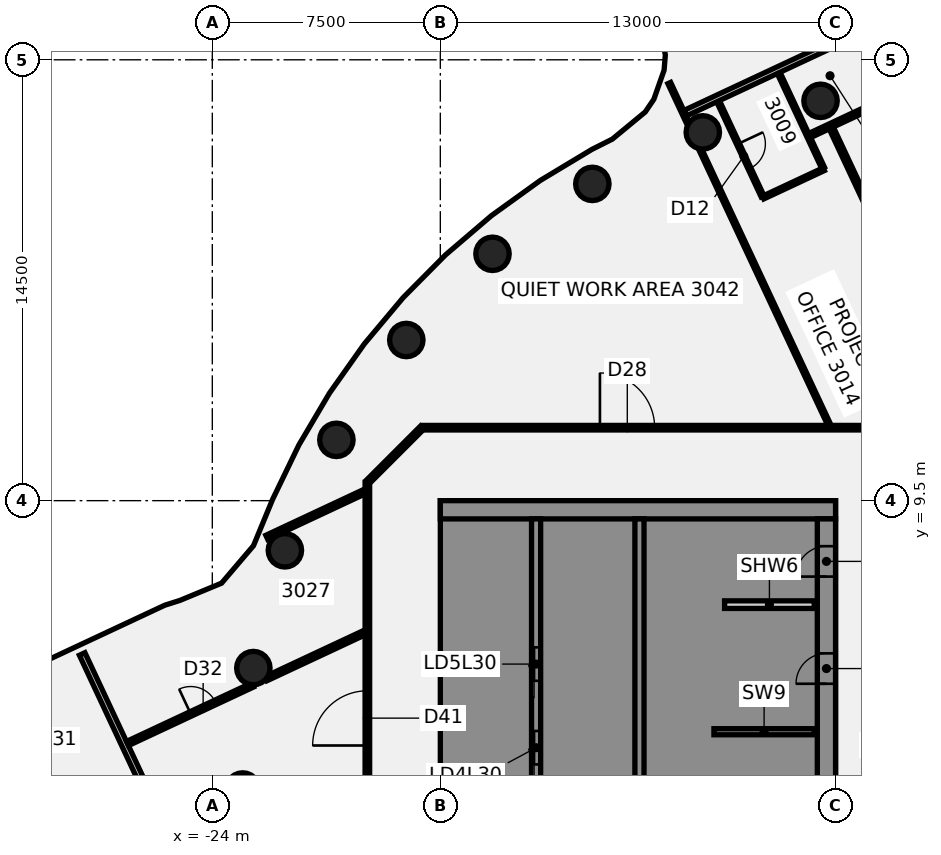
"""IFC4 building model, lengths in metres.
Left out: names, types, materials, properties, quantities, classifications, styles, units other than length and angle.
Written with IfcOpenShell. Run it as: python <this file> out.ifc"""

import sys

from ifc_helpers import new_model, si_unit, direction, frame, frame_2d, origin, origin_2d, place, context, subcontext, project, spatial, polyline, rectangle, circle, outline, extrude, element, fill, save


model = new_model("IFC4")
c1 = context("Model", 3, precision=1e-05, world=origin(), true_north=direction((0.0, 1.0)))
c2 = subcontext(c1, "Body", "Model", "MODEL_VIEW")
j1 = project(units=[si_unit("LENGTHUNIT", "METRE"), si_unit("PLANEANGLEUNIT", "RADIAN")], contexts=[c1])
p1 = place(None, origin())
s1 = spatial("IfcSite", under=j1, at=p1, CompositionType="ELEMENT")
p2 = place(p1, origin())
s2 = spatial("IfcBuilding", under=s1, at=p2, CompositionType="ELEMENT")
p3 = place(p2, frame((0.0, 0.0, 124.75)))
s3 = spatial("IfcBuildingStorey", under=s2, at=p3, CompositionType="ELEMENT", Elevation=124.75)
for number, where, z_axis, x_axis in (
    (1, (-3.994, 22.651, -0.14), (0.0, 0.0, 1.0), (1.0, 0.0, 0.0)),
    (2, (-7.866, 21.613, -0.14), (0.0, 0.0, 1.0), (1.0, 0.0, 0.0)),
    (3, (-11.5, 19.919, -0.14), (0.0, 0.0, 1.0), (1.0, 0.0, 0.0)),
    (4, (-14.784, 17.619, -0.14), (0.0, 0.0, 1.0), (1.0, 0.0, 0.0)),
    (5, (-17.619, 14.784, -0.14), (0.0, 0.0, 1.0), (1.0, 0.0, 0.0)),
    (6, (-19.919, 11.5, -0.14), (0.0, 0.0, 1.0), (1.0, 0.0, 0.0)),
    (7, (-21.613, 7.866, -0.14), (0.0, 0.0, 1.0), (1.0, 0.0, 0.0)),
    (8, (-22.651, 3.994, -0.14), (0.0, 0.0, 1.0), (1.0, 0.0, 0.0)),
    (9, (-23.0, 0.0, -0.14), (0.0, 0.0, 1.0), (1.0, 0.0, 0.0)),
):
    element("IfcColumn", number, at=place(p3, frame(where, z_axis=z_axis, x_axis=x_axis)), inside=s3, PredefinedType="COLUMN", context=c2, shape_type="SweptSolid", body=[
        extrude(circle(Radius=0.55, at=origin_2d()), origin(), (0.0, 0.0, 1.0), 3.71),
    ])
p4 = place(p3, frame((-28.281, 4.457, 0.0), z_axis=(0.0, 0.0, 1.0), x_axis=(0.423799855828, -0.90575586236, 0.0)))
e10 = element("IfcWall", 10, at=p4, inside=s3, PredefinedType="PARTITIONING", context=c2, shape_type="SweptSolid", body=[
    extrude(rectangle(XDim=14.219, YDim=0.2, at=frame_2d((7.109, 0.0))), origin(), (0.0, 0.0, 1.0), 2.87),
])
p5 = place(p4, frame((5.8, 0.0, 0.0)))
e11 = element("IfcOpeningElement", 11, at=p5, cuts=e10, PredefinedType="OPENING", context=c2, shape_type="SweptSolid", body=[
    extrude(rectangle(XDim=1.4, YDim=2.1, at=frame_2d((0.7, 1.05))), frame((0.0, 0.11, 0.0), z_axis=(0.0, -1.0, 0.0), x_axis=(1.0, 0.0, 0.0)), (0.0, 0.0, 1.0), 0.22),
])
p6 = place(p3, frame((-10.294, 41.169, 0.0), z_axis=(0.0, 0.0, 1.0), x_axis=(0.423769207005, -0.905770202201, 0.0)))
e12 = element("IfcWall", 12, at=p6, inside=s3, PredefinedType="PARTITIONING", context=c2, shape_type="SweptSolid", body=[
    extrude(rectangle(XDim=20.246, YDim=0.15, at=frame_2d((10.123, 0.0))), origin(), (0.0, 0.0, 1.0), 2.87),
])
p7 = place(p6, frame((18.375, 0.0, 0.0)))
e13 = element("IfcOpeningElement", 13, at=p7, cuts=e12, PredefinedType="OPENING", context=c2, shape_type="SweptSolid", body=[
    extrude(rectangle(XDim=1.0, YDim=2.1, at=frame_2d((0.5, 1.05))), frame((0.0, 0.085, 0.0), z_axis=(0.0, -1.0, 0.0), x_axis=(1.0, 0.0, 0.0)), (0.0, 0.0, 1.0), 0.17),
])
p8 = place(p6, frame((15.825, 0.0, 0.0)))
e14 = element("IfcOpeningElement", 14, at=p8, cuts=e12, PredefinedType="OPENING", context=c2, shape_type="SweptSolid", body=[
    extrude(rectangle(XDim=0.9, YDim=2.1, at=frame_2d((0.45, 1.05))), frame((0.0, 0.085, 0.0), z_axis=(0.0, -1.0, 0.0), x_axis=(1.0, 0.0, 0.0)), (0.0, 0.0, 1.0), 0.17),
])
p9 = place(p6, frame((10.125, 0.0, 0.0)))
e15 = element("IfcOpeningElement", 15, at=p9, cuts=e12, PredefinedType="OPENING", context=c2, shape_type="SweptSolid", body=[
    extrude(rectangle(XDim=0.9, YDim=2.1, at=frame_2d((0.45, 1.05))), frame((0.0, 0.085, 0.0), z_axis=(0.0, -1.0, 0.0), x_axis=(1.0, 0.0, 0.0)), (0.0, 0.0, 1.0), 0.17),
])
p10 = place(p6, frame((6.825, 0.0, 0.0)))
e16 = element("IfcOpeningElement", 16, at=p10, cuts=e12, PredefinedType="OPENING", context=c2, shape_type="SweptSolid", body=[
    extrude(rectangle(XDim=0.9, YDim=2.1, at=frame_2d((0.45, 1.05))), frame((0.0, 0.085, 0.0), z_axis=(0.0, -1.0, 0.0), x_axis=(1.0, 0.0, 0.0)), (0.0, 0.0, 1.0), 0.17),
])
p11 = place(p6, frame((2.325, 0.0, 0.0)))
e17 = element("IfcOpeningElement", 17, at=p11, cuts=e12, PredefinedType="OPENING", context=c2, shape_type="SweptSolid", body=[
    extrude(rectangle(XDim=0.9, YDim=2.1, at=frame_2d((0.45, 1.05))), frame((0.0, 0.085, 0.0), z_axis=(0.0, -1.0, 0.0), x_axis=(1.0, 0.0, 0.0)), (0.0, 0.0, 1.0), 0.17),
])
p12 = place(p3, frame((-8.969, 23.236, 0.0), z_axis=(0.0, 0.0, 1.0), x_axis=(0.423755205879, -0.905776752567, 0.0)))
e18 = element("IfcWall", 18, at=p12, inside=s3, PredefinedType="PARTITIONING", context=c2, shape_type="SweptSolid", body=[
    extrude(rectangle(XDim=1.475, YDim=0.1, at=frame_2d((0.737, 0.0))), origin(), (0.0, 0.0, 1.0), 2.97),
])
p13 = place(p3, frame((-7.96, 21.078, 0.0), z_axis=(0.0, 0.0, 1.0), x_axis=(0.423844267344, -0.905735081047, 0.0)))
e19 = element("IfcWall", 19, at=p13, inside=s3, PredefinedType="PARTITIONING", context=c2, shape_type="SweptSolid", body=[
    extrude(rectangle(XDim=10.048, YDim=0.1, at=frame_2d((5.024, 0.0))), origin(), (0.0, 0.0, 1.0), 2.97),
])
p14 = place(p3, frame((-7.365, 22.638, 0.0), z_axis=(0.0, 0.0, 1.0), x_axis=(0.423671993632, -0.905815677614, 0.0)))
e20 = element("IfcWall", 20, at=p14, inside=s3, PredefinedType="PARTITIONING", context=c2, shape_type="SweptSolid", body=[
    extrude(rectangle(XDim=3.449, YDim=0.1, at=frame_2d((1.724, 0.0))), origin(), (0.0, 0.0, 1.0), 2.87),
])
p15 = place(p14, frame((1.55, 0.0, 0.0)))
e21 = element("IfcOpeningElement", 21, at=p15, cuts=e20, PredefinedType="OPENING", context=c2, shape_type="SweptSolid", body=[
    extrude(rectangle(XDim=0.9, YDim=2.1, at=frame_2d((0.45, 1.05))), frame((0.0, 0.06, 0.0), z_axis=(0.0, -1.0, 0.0), x_axis=(1.0, 0.0, 0.0)), (0.0, 0.0, 1.0), 0.12),
])
p16 = place(p3, frame((-5.371, 23.567, 0.0), z_axis=(0.0, 0.0, 1.0), x_axis=(0.423878271215, -0.90571916795, 0.0)))
e22 = element("IfcWall", 22, at=p16, inside=s3, PredefinedType="PARTITIONING", context=c2, shape_type="SweptSolid", body=[
    extrude(rectangle(XDim=3.446, YDim=0.1, at=frame_2d((1.723, 0.0))), origin(), (0.0, 0.0, 1.0), 2.87),
])
p17 = place(p3, frame((-3.641, 21.759, 0.0), z_axis=(0.0, 0.0, 1.0), x_axis=(0.423809726716, -0.905751243743, 0.0)))
e23 = element("IfcWall", 23, at=p17, inside=s3, PredefinedType="PARTITIONING", context=c2, shape_type="SweptSolid", body=[
    extrude(rectangle(XDim=10.785, YDim=0.15, at=frame_2d((5.393, 0.0))), origin(), (0.0, 0.0, 1.0), 2.97),
])
p18 = place(p17, frame((3.525, 0.0, 0.0)))
e24 = element("IfcOpeningElement", 24, at=p18, cuts=e23, PredefinedType="OPENING", context=c2, shape_type="SweptSolid", body=[
    extrude(rectangle(XDim=0.9, YDim=2.1, at=frame_2d((0.45, 1.05))), frame((0.0, 0.085, 0.0), z_axis=(0.0, -1.0, 0.0), x_axis=(1.0, 0.0, 0.0)), (0.0, 0.0, 1.0), 0.17),
])
p19 = place(p3, frame((-17.065, 11.9, 0.0), z_axis=(0.0, 0.0, 1.0), x_axis=(1.0, 0.0, 0.0)))
e25 = element("IfcWall", 25, at=p19, inside=s3, PredefinedType="PARTITIONING", context=c2, shape_type="SweptSolid", body=[
    extrude(rectangle(XDim=34.165, YDim=0.15, at=frame_2d((17.083, 0.0))), origin(), (0.0, 0.0, 1.0), 2.97),
])
p20 = place(p19, frame((20.887, 0.0, 0.0)))
e26 = element("IfcOpeningElement", 26, at=p20, cuts=e25, PredefinedType="OPENING", context=c2, shape_type="SweptSolid", body=[
    extrude(rectangle(XDim=1.8, YDim=2.1, at=frame_2d((0.9, 1.05))), frame((0.0, 0.085, 0.0), z_axis=(0.0, -1.0, 0.0), x_axis=(1.0, 0.0, 0.0)), (0.0, 0.0, 1.0), 0.17),
])
p21 = place(p19, frame((30.913, 0.0, 0.0)))
e27 = element("IfcOpeningElement", 27, at=p21, cuts=e25, PredefinedType="OPENING", context=c2, shape_type="SweptSolid", body=[
    extrude(rectangle(XDim=1.8, YDim=2.1, at=frame_2d((0.9, 1.05))), frame((0.0, 0.085, 0.0), z_axis=(0.0, -1.0, 0.0), x_axis=(1.0, 0.0, 0.0)), (0.0, 0.0, 1.0), 0.17),
])
p22 = place(p19, frame((5.815, 0.0, 0.0)))
e28 = element("IfcOpeningElement", 28, at=p22, cuts=e25, PredefinedType="OPENING", context=c2, shape_type="SweptSolid", body=[
    extrude(rectangle(XDim=1.8, YDim=2.1, at=frame_2d((0.9, 1.05))), frame((0.0, 0.085, 0.0), z_axis=(0.0, -1.0, 0.0), x_axis=(1.0, 0.0, 0.0)), (0.0, 0.0, 1.0), 0.17),
])
p23 = place(p3, frame((-26.788, 1.513, 0.0), z_axis=(0.0, 0.0, 1.0), x_axis=(0.905759991445, 0.42379103093, 0.0)))
e29 = element("IfcWall", 29, at=p23, inside=s3, PredefinedType="PARTITIONING", context=c2, shape_type="SweptSolid", body=[
    extrude(rectangle(XDim=4.545, YDim=0.15, at=frame_2d((2.272, 0.0))), origin(), (0.0, 0.0, 1.0), 2.97),
])
p24 = place(p23, frame((2.295, 0.0, 0.0)))
e30 = element("IfcOpeningElement", 30, at=p24, cuts=e29, PredefinedType="OPENING", context=c2, shape_type="SweptSolid", body=[
    extrude(rectangle(XDim=0.9, YDim=2.1, at=frame_2d((0.45, 1.05))), frame((0.0, 0.085, 0.0), z_axis=(0.0, -1.0, 0.0), x_axis=(1.0, 0.0, 0.0)), (0.0, 0.0, 1.0), 0.17),
])
p25 = place(p3, frame((-22.237, 3.643, 0.0), z_axis=(0.0, 0.0, 1.0), x_axis=(0.905759778977, 0.423791485034, 0.0)))
e31 = element("IfcWall", 31, at=p25, inside=s3, PredefinedType="PARTITIONING", context=c2, shape_type="SweptSolid", body=[
    extrude(rectangle(XDim=3.584, YDim=0.15, at=frame_2d((1.792, 0.0))), origin(), (0.0, 0.0, 1.0), 2.97),
])
p26 = place(p3, frame((-22.208, 8.293, 0.0), z_axis=(0.0, 0.0, 1.0), x_axis=(0.905741880745, 0.42382973641, 0.0)))
e32 = element("IfcWall", 32, at=p26, inside=s3, PredefinedType="PARTITIONING", context=c2, shape_type="SweptSolid", body=[
    extrude(rectangle(XDim=3.552, YDim=0.15, at=frame_2d((1.776, 0.0))), origin(), (0.0, 0.0, 1.0), 2.97),
])
p27 = place(p3, frame((-8.44, 22.246, 0.0), z_axis=(0.0, 0.0, 1.0), x_axis=(0.905948211467, 0.423388519139, 0.0)))
e33 = element("IfcWall", 33, at=p27, inside=s3, PredefinedType="PARTITIONING", context=c2, shape_type="SweptSolid", body=[
    extrude(rectangle(XDim=14.239, YDim=0.2, at=frame_2d((7.119, 0.0))), origin(), (0.0, 0.0, 1.0), 2.87),
])
p28 = place(p27, frame((6.64, 0.0, 0.0)))
e34 = element("IfcOpeningElement", 34, at=p28, cuts=e33, PredefinedType="OPENING", context=c2, shape_type="SweptSolid", body=[
    extrude(rectangle(XDim=1.4, YDim=2.1, at=frame_2d((0.7, 1.05))), frame((0.0, 0.11, 0.0), z_axis=(0.0, -1.0, 0.0), x_axis=(1.0, 0.0, 0.0)), (0.0, 0.0, 1.0), 0.22),
])
p29 = place(p3, frame((-5.882, 19.469, 0.0), z_axis=(0.0, 0.0, 1.0), x_axis=(0.905879588514, 0.423535324517, 0.0)))
e35 = element("IfcWall", 35, at=p29, inside=s3, PredefinedType="PARTITIONING", context=c2, shape_type="SweptSolid", body=[
    extrude(rectangle(XDim=2.2, YDim=0.1, at=frame_2d((1.1, 0.0))), origin(), (0.0, 0.0, 1.0), 2.97),
])
p30 = place(p3, frame((-4.352, 21.509, 0.0), z_axis=(0.0, 0.0, 1.0), x_axis=(0.905651681577, 0.424022442398, 0.0)))
e36 = element("IfcWall", 36, at=p30, inside=s3, PredefinedType="PARTITIONING", context=c2, shape_type="SweptSolid", body=[
    extrude(rectangle(XDim=2.95, YDim=0.15, at=frame_2d((1.475, 0.0))), origin(), (0.0, 0.0, 1.0), 2.87),
])
p31 = place(p3, frame((-18.872, 10.128, 0.0), z_axis=(0.0, 0.0, 1.0), x_axis=(0.707106781187, 0.707106781187, 0.0)))
e37 = element("IfcWall", 37, at=p31, inside=s3, PredefinedType="PARTITIONING", context=c2, shape_type="SweptSolid", body=[
    extrude(rectangle(XDim=2.505, YDim=0.15, at=frame_2d((1.253, 0.0))), origin(), (0.0, 0.0, 1.0), 2.97),
])
p32 = place(p3, frame((-18.9, -10.1, 0.0), z_axis=(0.0, 0.0, 1.0), x_axis=(0.0, 1.0, 0.0)))
e38 = element("IfcWall", 38, at=p32, inside=s3, PredefinedType="PARTITIONING", context=c2, shape_type="SweptSolid", body=[
    extrude(rectangle(XDim=20.2, YDim=0.15, at=frame_2d((10.1, 0.0))), origin(), (0.0, 0.0, 1.0), 2.97),
])
p33 = place(p32, frame((11.547, 0.0, 0.0)))
e39 = element("IfcOpeningElement", 39, at=p33, cuts=e38, PredefinedType="OPENING", context=c2, shape_type="SweptSolid", body=[
    extrude(rectangle(XDim=1.8, YDim=2.1, at=frame_2d((0.9, 1.05))), frame((0.0, 0.085, 0.0), z_axis=(0.0, -1.0, 0.0), x_axis=(1.0, 0.0, 0.0)), (0.0, 0.0, 1.0), 0.17),
])
p34 = place(p32, frame((4.51, 0.0, 0.0)))
e40 = element("IfcOpeningElement", 40, at=p34, cuts=e38, PredefinedType="OPENING", context=c2, shape_type="SweptSolid", body=[
    extrude(rectangle(XDim=0.9, YDim=2.1, at=frame_2d((0.45, 1.05))), frame((0.0, 0.085, 0.0), z_axis=(0.0, -1.0, 0.0), x_axis=(1.0, 0.0, 0.0)), (0.0, 0.0, 1.0), 0.17),
])
p35 = place(p3, origin())
e41 = element("IfcWall", 41, at=p35, inside=s3, PredefinedType="SHEAR", context=c2, shape_type="SweptSolid", body=[
    extrude(outline(polyline([(-13.5, -8.9), (-13.5, -8.125), (-15.9, -8.125), (-15.9, -5.625), (-13.5, -5.625), (-13.5, -5.375), (-15.9, -5.375), (-15.9, -2.875), (-13.5, -2.875), (-13.5, -2.625), (-15.9, -2.625), (-15.9, -0.125), (-13.5, -0.125), (-13.5, 0.125), (-15.9, 0.125), (-15.9, 2.625), (-13.5, 2.625), (-13.5, 2.875), (-15.9, 2.875), (-15.9, 5.375), (-13.5, 5.375), (-13.5, 5.625), (-15.9, 5.625), (-15.9, 8.125), (-13.5, 8.125), (-13.5, 8.9), (-15.9, 8.9), (-16.5, 8.9), (-16.5, -8.9), (-15.9, -8.9), (-13.5, -8.9)])), origin(), (0.0, 0.0, 1.0), 3.57),
])
p36 = place(p3, frame((-16.5, 9.2, 0.0), z_axis=(0.0, 0.0, 1.0), x_axis=(1.0, 0.0, 0.0)))
e42 = element("IfcWall", 42, at=p36, inside=s3, PredefinedType="SHEAR", context=c2, shape_type="SweptSolid", body=[
    extrude(rectangle(XDim=13.0, YDim=0.6, at=frame_2d((6.5, 0.0))), origin(), (0.0, 0.0, 1.0), 3.57),
])
p37 = place(p3, origin())
e43 = element("IfcWall", 43, at=p37, inside=s3, PredefinedType="SHEAR", context=c2, shape_type="SweptSolid", body=[
    extrude(outline(polyline([(-9.8, -5.375), (-9.8, -5.625), (-7.5, -5.625), (-7.2, -5.625), (-7.2, 8.9), (-7.5, 8.9), (-9.8, 8.9), (-9.8, 8.125), (-7.5, 8.125), (-7.5, 5.625), (-9.8, 5.625), (-9.8, 5.375), (-7.5, 5.375), (-7.5, 2.875), (-9.8, 2.875), (-9.8, 2.625), (-7.5, 2.625), (-7.5, 0.125), (-9.8, 0.125), (-9.8, -0.125), (-7.5, -0.125), (-7.5, -2.625), (-9.8, -2.625), (-9.8, -2.875), (-7.5, -2.875), (-7.5, -5.375), (-9.8, -5.375)])), origin(), (0.0, 0.0, 1.0), 3.57),
])
p38 = place(p3, frame((-7.5, 1.9, 0.0), z_axis=(0.0, 0.0, 1.0), x_axis=(1.0, 0.0, 0.0)))
e44 = element("IfcWall", 44, at=p38, inside=s3, PredefinedType="SHEAR", context=c2, shape_type="SweptSolid", body=[
    extrude(rectangle(XDim=3.3, YDim=0.2, at=frame_2d((1.65, 0.0))), origin(), (0.0, 0.0, 1.0), 3.57),
])
p39 = place(p3, frame((-13.35, -8.9, 0.0), z_axis=(0.0, 0.0, 1.0), x_axis=(0.0, 1.0, 0.0)))
e45 = element("IfcWall", 45, at=p39, inside=s3, PredefinedType="SHEAR", context=c2, shape_type="SweptSolid", body=[
    extrude(rectangle(XDim=17.8, YDim=0.3, at=frame_2d((8.9, 0.0))), origin(), (0.0, 0.0, 1.0), 3.57),
])
p40 = place(p39, frame((1.325, 0.0, 0.0)))
e46 = element("IfcOpeningElement", 46, at=p40, cuts=e45, PredefinedType="OPENING", context=c2, shape_type="SweptSolid", body=[
    extrude(rectangle(XDim=1.4, YDim=2.1, at=frame_2d((0.7, 1.05))), frame((0.0, 0.16, 0.0), z_axis=(0.0, -1.0, 0.0), x_axis=(1.0, 0.0, 0.0)), (0.0, 0.0, 1.0), 0.32),
])
p41 = place(p39, frame((4.225, 0.0, 0.0)))
e47 = element("IfcOpeningElement", 47, at=p41, cuts=e45, PredefinedType="OPENING", context=c2, shape_type="SweptSolid", body=[
    extrude(rectangle(XDim=1.1, YDim=2.1, at=frame_2d((0.55, 1.05))), frame((0.0, 0.16, 0.0), z_axis=(0.0, -1.0, 0.0), x_axis=(1.0, 0.0, 0.0)), (0.0, 0.0, 1.0), 0.32),
])
p42 = place(p39, frame((6.975, 0.0, 0.0)))
e48 = element("IfcOpeningElement", 48, at=p42, cuts=e45, PredefinedType="OPENING", context=c2, shape_type="SweptSolid", body=[
    extrude(rectangle(XDim=1.1, YDim=2.1, at=frame_2d((0.55, 1.05))), frame((0.0, 0.16, 0.0), z_axis=(0.0, -1.0, 0.0), x_axis=(1.0, 0.0, 0.0)), (0.0, 0.0, 1.0), 0.32),
])
p43 = place(p39, frame((9.725, 0.0, 0.0)))
e49 = element("IfcOpeningElement", 49, at=p43, cuts=e45, PredefinedType="OPENING", context=c2, shape_type="SweptSolid", body=[
    extrude(rectangle(XDim=1.1, YDim=2.1, at=frame_2d((0.55, 1.05))), frame((0.0, 0.16, 0.0), z_axis=(0.0, -1.0, 0.0), x_axis=(1.0, 0.0, 0.0)), (0.0, 0.0, 1.0), 0.32),
])
p44 = place(p39, frame((12.475, 0.0, 0.0)))
e50 = element("IfcOpeningElement", 50, at=p44, cuts=e45, PredefinedType="OPENING", context=c2, shape_type="SweptSolid", body=[
    extrude(rectangle(XDim=1.1, YDim=2.1, at=frame_2d((0.55, 1.05))), frame((0.0, 0.16, 0.0), z_axis=(0.0, -1.0, 0.0), x_axis=(1.0, 0.0, 0.0)), (0.0, 0.0, 1.0), 0.32),
])
p45 = place(p3, frame((-9.95, -8.9, 0.0), z_axis=(0.0, 0.0, 1.0), x_axis=(0.0, 1.0, 0.0)))
e51 = element("IfcWall", 51, at=p45, inside=s3, PredefinedType="SHEAR", context=c2, shape_type="SweptSolid", body=[
    extrude(rectangle(XDim=17.8, YDim=0.3, at=frame_2d((8.9, 0.0))), origin(), (0.0, 0.0, 1.0), 3.57),
])
p46 = place(p3, frame((-3.8, -8.9, 0.0), z_axis=(0.0, 0.0, 1.0), x_axis=(0.0, 1.0, 0.0)))
e52 = element("IfcWall", 52, at=p46, inside=s3, PredefinedType="SHEAR", context=c2, shape_type="SweptSolid", body=[
    extrude(rectangle(XDim=17.8, YDim=0.6, at=frame_2d((8.9, 0.0))), origin(), (0.0, 0.0, 1.0), 3.57),
])
p47 = place(p46, frame((1.25, 0.0, 0.0)))
e53 = element("IfcOpeningElement", 53, at=p47, cuts=e52, PredefinedType="OPENING", context=c2, shape_type="SweptSolid", body=[
    extrude(rectangle(XDim=1.8, YDim=2.1, at=frame_2d((0.9, 1.05))), frame((0.0, 0.31, 0.0), z_axis=(0.0, -1.0, 0.0), x_axis=(1.0, 0.0, 0.0)), (0.0, 0.0, 1.0), 0.62),
])
p48 = place(p46, frame((12.377, 0.0, 0.0)))
e54 = element("IfcOpeningElement", 54, at=p48, cuts=e52, PredefinedType="OPENING", context=c2, shape_type="SweptSolid", body=[
    extrude(rectangle(XDim=1.0, YDim=2.1, at=frame_2d((0.5, 1.05))), frame((0.0, 0.31, 0.0), z_axis=(0.0, -1.0, 0.0), x_axis=(1.0, 0.0, 0.0)), (0.0, 0.0, 1.0), 0.62),
])
p49 = place(p46, frame((15.903, 0.0, 0.0)))
e55 = element("IfcOpeningElement", 55, at=p49, cuts=e52, PredefinedType="OPENING", context=c2, shape_type="SweptSolid", body=[
    extrude(rectangle(XDim=1.0, YDim=2.1, at=frame_2d((0.5, 1.05))), frame((0.0, 0.31, 0.0), z_axis=(0.0, -1.0, 0.0), x_axis=(1.0, 0.0, 0.0)), (0.0, 0.0, 1.0), 0.62),
])
p50 = place(p3, frame((-7.15, 6.08, 0.0), z_axis=(0.0, 0.0, 1.0), x_axis=(1.0, 0.0, 0.0)))
e56 = element("IfcWall", 56, at=p50, inside=s3, PredefinedType="PARTITIONING", context=c2, shape_type="SweptSolid", body=[
    extrude(rectangle(XDim=2.95, YDim=0.25, at=frame_2d((1.475, 0.0))), origin(), (0.0, 0.0, 1.0), 3.57),
])
p51 = place(p15, origin())
e57 = element("IfcDoor", 57, at=p51, inside=s3, OperationType="SINGLE_SWING_LEFT", PredefinedType="DOOR", context=c2, shape_type="SweptSolid", body=[
    extrude(rectangle(XDim=0.9, YDim=2.1, at=frame_2d((0.45, 1.05))), frame((0.0, 0.025, 0.0), z_axis=(0.0, -1.0, 0.0), x_axis=(1.0, 0.0, 0.0)), (0.0, 0.0, 1.0), 0.05),
])
fill(e21, e57)
p52 = place(p22, origin())
e58 = element("IfcDoor", 58, at=p52, inside=s3, OperationType="DOUBLE_DOOR_SINGLE_SWING", PredefinedType="DOOR", context=c2, shape_type="SweptSolid", body=[
    extrude(rectangle(XDim=1.8, YDim=2.1, at=frame_2d((0.9, 1.05))), frame((0.0, 0.025, 0.0), z_axis=(0.0, -1.0, 0.0), x_axis=(1.0, 0.0, 0.0)), (0.0, 0.0, 1.0), 0.05),
])
fill(e28, e58)
p53 = place(p24, origin())
e59 = element("IfcDoor", 59, at=p53, inside=s3, OperationType="SINGLE_SWING_LEFT", PredefinedType="DOOR", context=c2, shape_type="SweptSolid", body=[
    extrude(rectangle(XDim=0.9, YDim=2.1, at=frame_2d((0.45, 1.05))), frame((0.0, 0.025, 0.0), z_axis=(0.0, -1.0, 0.0), x_axis=(1.0, 0.0, 0.0)), (0.0, 0.0, 1.0), 0.05),
])
fill(e30, e59)
p54 = place(p33, frame((1.8, 0.0, 0.0), z_axis=(0.0, 0.0, 1.0), x_axis=(-1.0, 0.0, 0.0)))
e60 = element("IfcDoor", 60, at=p54, inside=s3, OperationType="DOUBLE_DOOR_SINGLE_SWING", PredefinedType="DOOR", context=c2, shape_type="SweptSolid", body=[
    extrude(rectangle(XDim=1.8, YDim=2.1, at=frame_2d((0.9, 1.05))), frame((0.0, 0.025, 0.0), z_axis=(0.0, -1.0, 0.0), x_axis=(1.0, 0.0, 0.0)), (0.0, 0.0, 1.0), 0.05),
])
fill(e39, e60)
p55 = place(p48, origin())
e61 = element("IfcDoor", 61, at=p55, inside=s3, OperationType="SINGLE_SWING_LEFT", PredefinedType="DOOR", context=c2, shape_type="SweptSolid", body=[
    extrude(rectangle(XDim=1.0, YDim=2.1, at=frame_2d((0.5, 1.05))), frame((0.0, 0.275, 0.0), z_axis=(0.0, -1.0, 0.0), x_axis=(1.0, 0.0, 0.0)), (0.0, 0.0, 1.0), 0.05),
])
fill(e54, e61)
p56 = place(p49, origin())
e62 = element("IfcDoor", 62, at=p56, inside=s3, OperationType="SINGLE_SWING_LEFT", PredefinedType="DOOR", context=c2, shape_type="SweptSolid", body=[
    extrude(rectangle(XDim=1.0, YDim=2.1, at=frame_2d((0.5, 1.05))), frame((0.0, 0.275, 0.0), z_axis=(0.0, -1.0, 0.0), x_axis=(1.0, 0.0, 0.0)), (0.0, 0.0, 1.0), 0.05),
])
fill(e55, e62)
p57 = place(p43, origin())
e63 = element("IfcDoor", 63, at=p57, inside=s3, OperationType="SLIDING_TO_LEFT", PredefinedType="DOOR", context=c2, shape_type="SweptSolid", body=[
    extrude(rectangle(XDim=1.1, YDim=2.1, at=frame_2d((0.55, 1.05))), frame((0.0, 0.025, 0.0), z_axis=(0.0, -1.0, 0.0), x_axis=(1.0, 0.0, 0.0)), (0.0, 0.0, 1.0), 0.05),
])
fill(e49, e63)
p58 = place(p44, origin())
e64 = element("IfcDoor", 64, at=p58, inside=s3, OperationType="SLIDING_TO_LEFT", PredefinedType="DOOR", context=c2, shape_type="SweptSolid", body=[
    extrude(rectangle(XDim=1.1, YDim=2.1, at=frame_2d((0.55, 1.05))), frame((0.0, 0.025, 0.0), z_axis=(0.0, -1.0, 0.0), x_axis=(1.0, 0.0, 0.0)), (0.0, 0.0, 1.0), 0.05),
])
fill(e50, e64)
save(model, sys.argv[1])
